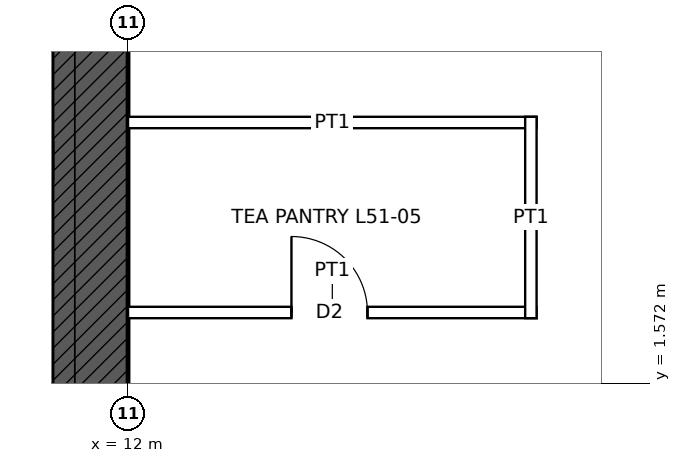
"""IFC4 building model, lengths in metres.
Left out: names, types, materials, properties, quantities, classifications, styles, units other than length and angle.
Written with IfcOpenShell. Run it as: python <this file> out.ifc"""

import sys

from ifc_helpers import new_model, si_unit, direction, frame, frame_2d, origin, place, context, subcontext, project, spatial, rectangle, extrude, element, fill, save


model = new_model("IFC4")
c1 = context("Model", 3, precision=1e-05, world=origin(), true_north=direction((0.0, 1.0)))
c2 = subcontext(c1, "Body", "Model", "MODEL_VIEW")
j1 = project(units=[si_unit("LENGTHUNIT", "METRE"), si_unit("PLANEANGLEUNIT", "RADIAN")], contexts=[c1])
p1 = place(None, origin())
s1 = spatial("IfcSite", under=j1, at=p1, CompositionType="ELEMENT")
p2 = place(p1, origin())
s2 = spatial("IfcBuilding", under=s1, at=p2, CompositionType="ELEMENT")
p3 = place(p2, frame((0.0, 0.0, 237.9)))
s3 = spatial("IfcBuildingStorey", under=s2, at=p3, CompositionType="ELEMENT", Elevation=237.9)
p4 = place(p3, frame((11.5, 11.0, 0.0), z_axis=(0.0, 0.0, 1.0), x_axis=(0.0, -1.0, 0.0)))
e1 = element("IfcWall", 1, at=p4, inside=s3, PredefinedType="SHEAR", context=c2, shape_type="SweptSolid", body=[
    extrude(rectangle(XDim=22.0, YDim=1.0, at=frame_2d((11.0, 0.0))), origin(), (0.0, 0.0, 1.0), 4.0),
])
p5 = place(p4, frame((10.5, 0.0, 0.0)))
e2 = element("IfcOpeningElement", 2, at=p5, cuts=e1, PredefinedType="OPENING", context=c2, shape_type="SweptSolid", body=[
    extrude(rectangle(XDim=1.0, YDim=2.4, at=frame_2d((0.5, 1.2))), frame((0.0, 0.51, 0.0), z_axis=(0.0, -1.0, 0.0), x_axis=(1.0, 0.0, 0.0)), (0.0, 0.0, 1.0), 1.02),
])
p6 = place(p3, frame((12.0, 2.5, 0.0), z_axis=(0.0, 0.0, 1.0), x_axis=(1.0, 0.0, 0.0)))
e3 = element("IfcWall", 3, at=p6, inside=s3, PredefinedType="PARTITIONING", context=c2, shape_type="SweptSolid", body=[
    extrude(rectangle(XDim=5.375, YDim=0.15, at=frame_2d((2.688, 0.0))), origin(), (0.0, 0.0, 1.0), 3.85),
])
p7 = place(p6, frame((2.15, 0.0, 0.0)))
e4 = element("IfcOpeningElement", 4, at=p7, cuts=e3, PredefinedType="OPENING", context=c2, shape_type="SweptSolid", body=[
    extrude(rectangle(XDim=1.0, YDim=2.1, at=frame_2d((0.5, 1.05))), frame((0.0, 0.085, 0.0), z_axis=(0.0, -1.0, 0.0), x_axis=(1.0, 0.0, 0.0)), (0.0, 0.0, 1.0), 0.17),
])
p8 = place(p3, frame((12.0, 5.0, 0.0), z_axis=(0.0, 0.0, 1.0), x_axis=(1.0, 0.0, 0.0)))
e5 = element("IfcWall", 5, at=p8, inside=s3, PredefinedType="PARTITIONING", context=c2, shape_type="SweptSolid", body=[
    extrude(rectangle(XDim=5.375, YDim=0.15, at=frame_2d((2.688, 0.0))), origin(), (0.0, 0.0, 1.0), 3.85),
])
p9 = place(p3, frame((17.3, 2.425, 0.0), z_axis=(0.0, 0.0, 1.0), x_axis=(0.0, 1.0, 0.0)))
e6 = element("IfcWall", 6, at=p9, inside=s3, PredefinedType="PARTITIONING", context=c2, shape_type="SweptSolid", body=[
    extrude(rectangle(XDim=2.65, YDim=0.15, at=frame_2d((1.325, 0.0))), origin(), (0.0, 0.0, 1.0), 3.85),
])
p10 = place(p7, origin())
e7 = element("IfcDoor", 7, at=p10, inside=s3, OperationType="SINGLE_SWING_LEFT", PredefinedType="DOOR", context=c2, shape_type="SweptSolid", body=[
    extrude(rectangle(XDim=1.0, YDim=2.1, at=frame_2d((0.5, 1.05))), frame((0.0, 0.025, 0.0), z_axis=(0.0, -1.0, 0.0), x_axis=(1.0, 0.0, 0.0)), (0.0, 0.0, 1.0), 0.05),
])
fill(e4, e7)
save(model, sys.argv[1])
